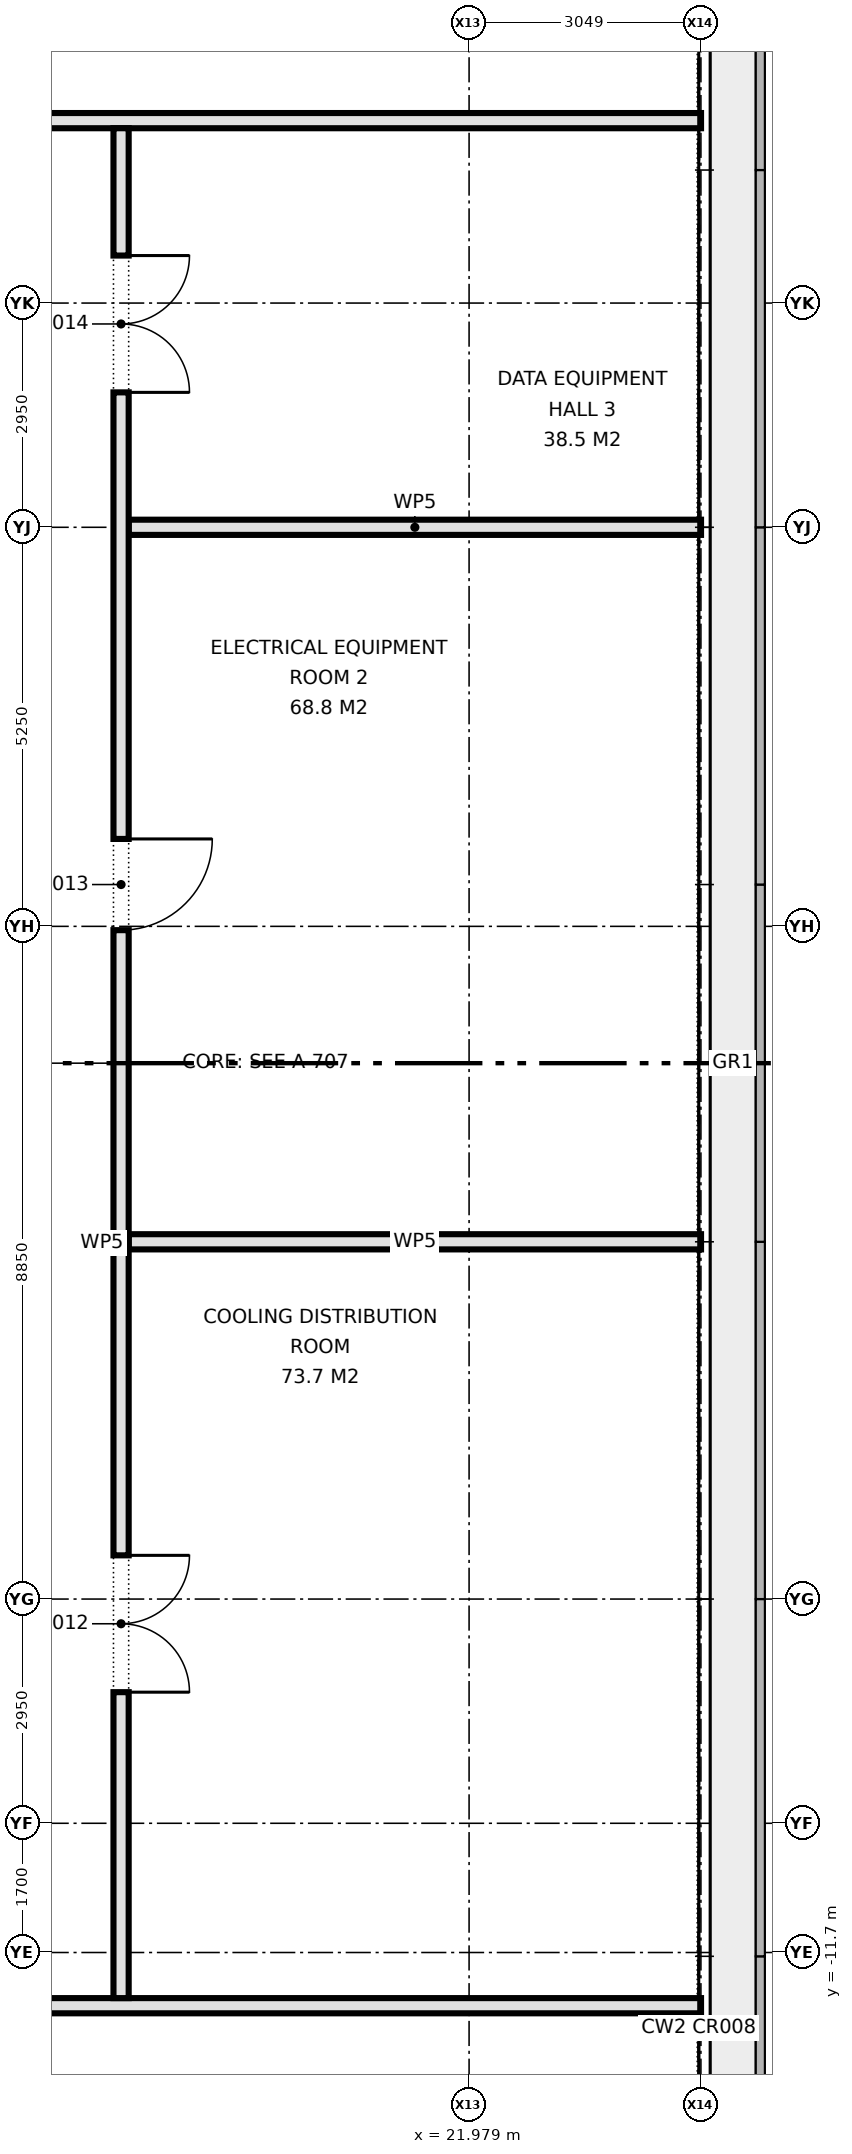
"""IFC4 building model, lengths in metres.
Left out: names, types, materials, properties, quantities, classifications, styles, units other than length and angle.
Written with IfcOpenShell. Run it as: python <this file> out.ifc"""

import sys

from ifc_helpers import new_model, si_unit, direction, frame, frame_2d, origin, place, context, subcontext, project, spatial, rectangle, extrude, element, fill, save


model = new_model("IFC4")
c1 = context("Model", 3, precision=1e-05, world=origin(), true_north=direction((0.0, 1.0)))
c2 = subcontext(c1, "Body", "Model", "MODEL_VIEW")
j1 = project(units=[si_unit("LENGTHUNIT", "METRE"), si_unit("PLANEANGLEUNIT", "RADIAN")], contexts=[c1])
p1 = place(None, origin())
s1 = spatial("IfcSite", under=j1, at=p1, CompositionType="ELEMENT")
p2 = place(p1, origin())
s2 = spatial("IfcBuilding", under=s1, at=p2, CompositionType="ELEMENT")
p3 = place(p2, frame((0.0, 0.0, 59.3)))
s3 = spatial("IfcBuildingStorey", under=s2, at=p3, CompositionType="ELEMENT", Elevation=59.3)
p4 = place(p3, frame((-25.03, -12.4, 0.0), z_axis=(0.0, 0.0, 1.0), x_axis=(1.0, 0.0, 0.0)))
e1 = element("IfcWall", 1, at=p4, inside=s3, PredefinedType="PARTITIONING", context=c2, shape_type="SweptSolid", body=[
    extrude(rectangle(XDim=50.06, YDim=0.2, at=frame_2d((25.03, 0.0))), origin(), (0.0, 0.0, 1.0), 4.55),
])
p5 = place(p4, frame((18.95, 0.0, 0.0)))
e2 = element("IfcOpeningElement", 2, at=p5, cuts=e1, PredefinedType="OPENING", context=c2, shape_type="SweptSolid", body=[
    extrude(rectangle(XDim=1.8, YDim=2.1, at=frame_2d((0.9, 1.05))), frame((0.0, 0.11, 0.0), z_axis=(0.0, -1.0, 0.0), x_axis=(1.0, 0.0, 0.0)), (0.0, 0.0, 1.0), 0.22),
])
p6 = place(p4, frame((37.86, 0.0, 0.0)))
e3 = element("IfcOpeningElement", 3, at=p6, cuts=e1, PredefinedType="OPENING", context=c2, shape_type="SweptSolid", body=[
    extrude(rectangle(XDim=1.8, YDim=2.1, at=frame_2d((0.9, 1.05))), frame((0.0, 0.11, 0.0), z_axis=(0.0, -1.0, 0.0), x_axis=(1.0, 0.0, 0.0)), (0.0, 0.0, 1.0), 0.22),
])
p7 = place(p4, frame((32.98, 0.0, 0.0)))
e4 = element("IfcOpeningElement", 4, at=p7, cuts=e1, PredefinedType="OPENING", context=c2, shape_type="SweptSolid", body=[
    extrude(rectangle(XDim=1.2, YDim=2.1, at=frame_2d((0.6, 1.05))), frame((0.0, 0.11, 0.0), z_axis=(0.0, -1.0, 0.0), x_axis=(1.0, 0.0, 0.0)), (0.0, 0.0, 1.0), 0.22),
])
for number, where, z_axis, x_axis in (
    (5, (17.5, -2.35, 0.0), (0.0, 0.0, 1.0), (1.0, 0.0, 0.0)),
    (6, (17.5, 7.05, 0.0), (0.0, 0.0, 1.0), (1.0, 0.0, 0.0)),
):
    element("IfcWall", number, at=place(p3, frame(where, z_axis=z_axis, x_axis=x_axis)), inside=s3, PredefinedType="PARTITIONING", context=c2, shape_type="SweptSolid", body=[
        extrude(rectangle(XDim=7.53, YDim=0.2, at=frame_2d((3.765, 0.0))), origin(), (0.0, 0.0, 1.0), 4.55),
    ])
p8 = place(p3, frame((-25.03, 12.4, 0.0), z_axis=(0.0, 0.0, 1.0), x_axis=(1.0, 0.0, 0.0)))
e7 = element("IfcWall", 7, at=p8, inside=s3, PredefinedType="PARTITIONING", context=c2, shape_type="SweptSolid", body=[
    extrude(rectangle(XDim=50.06, YDim=0.2, at=frame_2d((25.03, 0.0))), origin(), (0.0, 0.0, 1.0), 4.55),
])
p9 = place(p8, frame((10.805, 0.0, 0.0)))
e8 = element("IfcOpeningElement", 8, at=p9, cuts=e7, PredefinedType="OPENING", context=c2, shape_type="SweptSolid", body=[
    extrude(rectangle(XDim=1.8, YDim=2.1, at=frame_2d((0.9, 1.05))), frame((0.0, 0.11, 0.0), z_axis=(0.0, -1.0, 0.0), x_axis=(1.0, 0.0, 0.0)), (0.0, 0.0, 1.0), 0.22),
])
p10 = place(p8, frame((8.28, 0.0, 0.0)))
e9 = element("IfcOpeningElement", 9, at=p10, cuts=e7, PredefinedType="OPENING", context=c2, shape_type="SweptSolid", body=[
    extrude(rectangle(XDim=1.2, YDim=2.1, at=frame_2d((0.6, 1.05))), frame((0.0, 0.11, 0.0), z_axis=(0.0, -1.0, 0.0), x_axis=(1.0, 0.0, 0.0)), (0.0, 0.0, 1.0), 0.22),
])
p11 = place(p8, frame((21.78, 0.0, 0.0)))
e10 = element("IfcOpeningElement", 10, at=p11, cuts=e7, PredefinedType="OPENING", context=c2, shape_type="SweptSolid", body=[
    extrude(rectangle(XDim=1.8, YDim=2.1, at=frame_2d((0.9, 1.05))), frame((0.0, 0.11, 0.0), z_axis=(0.0, -1.0, 0.0), x_axis=(1.0, 0.0, 0.0)), (0.0, 0.0, 1.0), 0.22),
])
p12 = place(p8, frame((36.36, 0.0, 0.0)))
e11 = element("IfcOpeningElement", 11, at=p12, cuts=e7, PredefinedType="OPENING", context=c2, shape_type="SweptSolid", body=[
    extrude(rectangle(XDim=1.8, YDim=2.1, at=frame_2d((0.9, 1.05))), frame((0.0, 0.11, 0.0), z_axis=(0.0, -1.0, 0.0), x_axis=(1.0, 0.0, 0.0)), (0.0, 0.0, 1.0), 0.22),
])
p13 = place(p3, frame((17.4, -12.3, 0.0), z_axis=(0.0, 0.0, 1.0), x_axis=(0.0, 1.0, 0.0)))
e12 = element("IfcWall", 12, at=p13, inside=s3, PredefinedType="PARTITIONING", context=c2, shape_type="SweptSolid", body=[
    extrude(rectangle(XDim=24.6, YDim=0.2, at=frame_2d((12.3, 0.0))), origin(), (0.0, 0.0, 1.0), 4.55),
])
p14 = place(p13, frame((4.025, 0.0, 0.0)))
e13 = element("IfcOpeningElement", 13, at=p14, cuts=e12, PredefinedType="OPENING", context=c2, shape_type="SweptSolid", body=[
    extrude(rectangle(XDim=1.8, YDim=2.1, at=frame_2d((0.9, 1.05))), frame((0.0, 0.11, 0.0), z_axis=(0.0, -1.0, 0.0), x_axis=(1.0, 0.0, 0.0)), (0.0, 0.0, 1.0), 0.22),
])
p15 = place(p13, frame((14.05, 0.0, 0.0)))
e14 = element("IfcOpeningElement", 14, at=p15, cuts=e12, PredefinedType="OPENING", context=c2, shape_type="SweptSolid", body=[
    extrude(rectangle(XDim=1.2, YDim=2.1, at=frame_2d((0.6, 1.05))), frame((0.0, 0.11, 0.0), z_axis=(0.0, -1.0, 0.0), x_axis=(1.0, 0.0, 0.0)), (0.0, 0.0, 1.0), 0.22),
])
p16 = place(p13, frame((21.125, 0.0, 0.0)))
e15 = element("IfcOpeningElement", 15, at=p16, cuts=e12, PredefinedType="OPENING", context=c2, shape_type="SweptSolid", body=[
    extrude(rectangle(XDim=1.8, YDim=2.1, at=frame_2d((0.9, 1.05))), frame((0.0, 0.11, 0.0), z_axis=(0.0, -1.0, 0.0), x_axis=(1.0, 0.0, 0.0)), (0.0, 0.0, 1.0), 0.22),
])
p17 = place(p14, frame((1.8, 0.0, 0.0), z_axis=(0.0, 0.0, 1.0), x_axis=(-1.0, 0.0, 0.0)))
e16 = element("IfcDoor", 16, at=p17, inside=s3, OperationType="DOUBLE_DOOR_SINGLE_SWING", PredefinedType="DOOR", context=c2, shape_type="SweptSolid", body=[
    extrude(rectangle(XDim=1.8, YDim=2.1, at=frame_2d((0.9, 1.05))), frame((0.0, 0.025, 0.0), z_axis=(0.0, -1.0, 0.0), x_axis=(1.0, 0.0, 0.0)), (0.0, 0.0, 1.0), 0.05),
])
fill(e13, e16)
p18 = place(p15, frame((1.2, 0.0, 0.0), z_axis=(0.0, 0.0, 1.0), x_axis=(-1.0, 0.0, 0.0)))
e17 = element("IfcDoor", 17, at=p18, inside=s3, OperationType="SINGLE_SWING_LEFT", PredefinedType="DOOR", context=c2, shape_type="SweptSolid", body=[
    extrude(rectangle(XDim=1.2, YDim=2.1, at=frame_2d((0.6, 1.05))), frame((0.0, 0.025, 0.0), z_axis=(0.0, -1.0, 0.0), x_axis=(1.0, 0.0, 0.0)), (0.0, 0.0, 1.0), 0.05),
])
fill(e14, e17)
p19 = place(p16, frame((1.8, 0.0, 0.0), z_axis=(0.0, 0.0, 1.0), x_axis=(-1.0, 0.0, 0.0)))
e18 = element("IfcDoor", 18, at=p19, inside=s3, OperationType="DOUBLE_DOOR_SINGLE_SWING", PredefinedType="DOOR", context=c2, shape_type="SweptSolid", body=[
    extrude(rectangle(XDim=1.8, YDim=2.1, at=frame_2d((0.9, 1.05))), frame((0.0, 0.025, 0.0), z_axis=(0.0, -1.0, 0.0), x_axis=(1.0, 0.0, 0.0)), (0.0, 0.0, 1.0), 0.05),
])
fill(e15, e18)
save(model, sys.argv[1])
